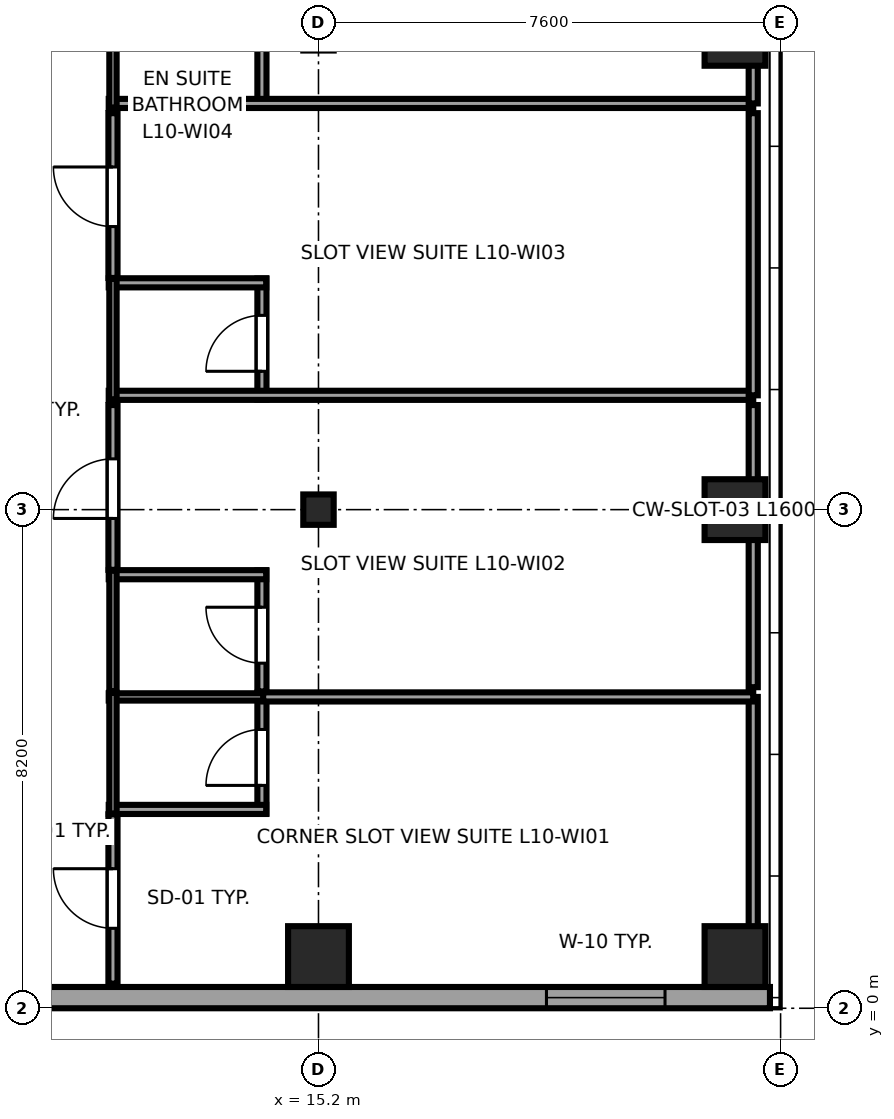
"""IFC4 building model, lengths in metres.
Left out: names, types, materials, properties, quantities, classifications, styles, units other than length and angle.
Written with IfcOpenShell. Run it as: python <this file> out.ifc"""

import sys

from ifc_helpers import new_model, si_unit, direction, frame, frame_2d, origin, origin_2d, place, context, subcontext, project, spatial, rectangle, i_section, extrude, source, transform, mapped, element, fill, save


model = new_model("IFC4")
c1 = context("Model", 3, precision=1e-05, world=origin(), true_north=direction((0.0, 1.0)))
c2 = subcontext(c1, "Body", "Model", "MODEL_VIEW")
j1 = project(units=[si_unit("LENGTHUNIT", "METRE"), si_unit("PLANEANGLEUNIT", "RADIAN")], contexts=[c1])
p1 = place(None, origin())
s1 = spatial("IfcSite", under=j1, at=p1, CompositionType="ELEMENT")
p2 = place(p1, origin())
s2 = spatial("IfcBuilding", under=s1, at=p2, CompositionType="ELEMENT")
p3 = place(p2, frame((0.0, 0.0, 46.2)))
s3 = spatial("IfcBuildingStorey", under=s2, at=p3, CompositionType="ELEMENT", Elevation=46.2)
m1 = source(origin(), c2, "Body", "SweptSolid", [
    extrude(rectangle(XDim=1.0, YDim=1.0, at=origin_2d()), origin(), (0.0, 0.0, 1.0), 3.55),
])
p4 = place(p3, frame((15.2, 0.85, 0.0), z_axis=(0.0, 0.0, 1.0), x_axis=(1.0, 0.0, 0.0)))
e1 = element("IfcColumn", 1, at=p4, inside=s3, PredefinedType="COLUMN", context=c2, shape_type="MappedRepresentation", body=[
    mapped(m1, transform((0.0, 0.0, 0.0), x_axis=(1.0, 0.0, 0.0), y_axis=(0.0, 1.0, 0.0), z_axis=(0.0, 0.0, 1.0), scale=1.0)),
])
m2 = source(origin(), c2, "Body", "SweptSolid", [
    extrude(i_section(OverallWidth=0.5, OverallDepth=0.5, WebThickness=0.028, FlangeThickness=0.045, at=origin_2d()), origin(), (0.0, 0.0, 1.0), 3.55),
])
p5 = place(p3, frame((15.2, 8.2, 0.0), z_axis=(0.0, 0.0, 1.0), x_axis=(1.0, 0.0, 0.0)))
e2 = element("IfcColumn", 2, at=p5, inside=s3, PredefinedType="COLUMN", context=c2, shape_type="MappedRepresentation", body=[
    mapped(m2, transform((0.0, 0.0, 0.0), x_axis=(1.0, 0.0, 0.0), y_axis=(0.0, 1.0, 0.0), z_axis=(0.0, 0.0, 1.0), scale=1.0)),
])
for number, where, z_axis, x_axis in (
    (3, (22.05, 0.85, 0.0), (0.0, 0.0, 1.0), (1.0, 0.0, 0.0)),
    (4, (22.05, 8.2, 0.0), (0.0, 0.0, 1.0), (1.0, 0.0, 0.0)),
    (5, (22.05, 16.0, 0.0), (0.0, 0.0, 1.0), (1.0, 0.0, 0.0)),
):
    element("IfcColumn", number, at=place(p3, frame(where, z_axis=z_axis, x_axis=x_axis)), inside=s3, PredefinedType="COLUMN", context=c2, shape_type="MappedRepresentation", body=[
        mapped(m1, transform((0.0, 0.0, 0.0), x_axis=(1.0, 0.0, 0.0), y_axis=(0.0, 1.0, 0.0), z_axis=(0.0, 0.0, 1.0), scale=1.0)),
    ])
p6 = place(p3, frame((4.617, 0.175, 0.0), z_axis=(0.0, 0.0, 1.0), x_axis=(1.0, 0.0, 0.0)))
e6 = element("IfcWall", 6, at=p6, inside=s3, PredefinedType="SOLIDWALL", context=c2, shape_type="SweptSolid", body=[
    extrude(rectangle(XDim=18.008, YDim=0.35, at=frame_2d((9.004, 0.0))), origin(), (0.0, 0.0, 1.0), 3.37),
])
p7 = place(p6, frame((14.332, 0.0, 0.68)))
e7 = element("IfcOpeningElement", 7, at=p7, cuts=e6, PredefinedType="OPENING", context=c2, shape_type="SweptSolid", body=[
    extrude(rectangle(XDim=1.95, YDim=1.82, at=frame_2d((0.975, 0.91))), frame((0.0, 0.185, 0.0), z_axis=(0.0, -1.0, 0.0), x_axis=(1.0, 0.0, 0.0)), (0.0, 0.0, 1.0), 0.37),
])
p8 = place(p3, frame((14.27, 3.2, 0.0), z_axis=(0.0, 0.0, 1.0), x_axis=(0.0, 1.0, 0.0)))
e8 = element("IfcWall", 8, at=p8, inside=s3, PredefinedType="PARTITIONING", context=c2, shape_type="SweptSolid", body=[
    extrude(rectangle(XDim=1.99, YDim=0.15, at=frame_2d((0.995, 0.0))), origin(), (0.0, 0.0, 1.0), 3.37),
])
p9 = place(p8, frame((0.465, 0.0, 0.0)))
e9 = element("IfcOpeningElement", 9, at=p9, cuts=e8, PredefinedType="OPENING", context=c2, shape_type="SweptSolid", body=[
    extrude(rectangle(XDim=0.92, YDim=2.01, at=frame_2d((0.46, 1.005))), frame((0.0, 0.085, 0.0), z_axis=(0.0, -1.0, 0.0), x_axis=(1.0, 0.0, 0.0)), (0.0, 0.0, 1.0), 0.17),
])
p10 = place(p3, frame((11.75, 3.27, 0.0), z_axis=(0.0, 0.0, 1.0), x_axis=(1.0, 0.0, 0.0)))
e10 = element("IfcWall", 10, at=p10, inside=s3, PredefinedType="PARTITIONING", context=c2, shape_type="SweptSolid", body=[
    extrude(rectangle(XDim=2.59, YDim=0.15, at=frame_2d((1.295, 0.0))), origin(), (0.0, 0.0, 1.0), 3.37),
])
p11 = place(p3, frame((11.75, 5.12, 0.0), z_axis=(0.0, 0.0, 1.0), x_axis=(1.0, 0.0, 0.0)))
e11 = element("IfcWall", 11, at=p11, inside=s3, PredefinedType="PLUMBINGWALL", context=c2, shape_type="SweptSolid", body=[
    extrude(rectangle(XDim=2.59, YDim=0.12, at=frame_2d((1.295, 0.0))), origin(), (0.0, 0.0, 1.0), 3.37),
])
p12 = place(p3, frame((11.82, 3.2, 0.0), z_axis=(0.0, 0.0, 1.0), x_axis=(0.0, 1.0, 0.0)))
e12 = element("IfcWall", 12, at=p12, inside=s3, PredefinedType="PLUMBINGWALL", context=c2, shape_type="SweptSolid", body=[
    extrude(rectangle(XDim=1.99, YDim=0.12, at=frame_2d((0.995, 0.0))), origin(), (0.0, 0.0, 1.0), 3.37),
])
p13 = place(p3, frame((14.27, 5.21, 0.0), z_axis=(0.0, 0.0, 1.0), x_axis=(0.0, 1.0, 0.0)))
e13 = element("IfcWall", 13, at=p13, inside=s3, PredefinedType="PARTITIONING", context=c2, shape_type="SweptSolid", body=[
    extrude(rectangle(XDim=1.99, YDim=0.15, at=frame_2d((0.995, 0.0))), origin(), (0.0, 0.0, 1.0), 3.37),
])
p14 = place(p13, frame((0.465, 0.0, 0.0)))
e14 = element("IfcOpeningElement", 14, at=p14, cuts=e13, PredefinedType="OPENING", context=c2, shape_type="SweptSolid", body=[
    extrude(rectangle(XDim=0.92, YDim=2.01, at=frame_2d((0.46, 1.005))), frame((0.0, 0.085, 0.0), z_axis=(0.0, -1.0, 0.0), x_axis=(1.0, 0.0, 0.0)), (0.0, 0.0, 1.0), 0.17),
])
p15 = place(p3, frame((11.75, 7.13, 0.0), z_axis=(0.0, 0.0, 1.0), x_axis=(1.0, 0.0, 0.0)))
e15 = element("IfcWall", 15, at=p15, inside=s3, PredefinedType="PARTITIONING", context=c2, shape_type="SweptSolid", body=[
    extrude(rectangle(XDim=2.59, YDim=0.15, at=frame_2d((1.295, 0.0))), origin(), (0.0, 0.0, 1.0), 3.37),
])
p16 = place(p3, frame((11.82, 5.21, 0.0), z_axis=(0.0, 0.0, 1.0), x_axis=(0.0, 1.0, 0.0)))
e16 = element("IfcWall", 16, at=p16, inside=s3, PredefinedType="PLUMBINGWALL", context=c2, shape_type="SweptSolid", body=[
    extrude(rectangle(XDim=1.99, YDim=0.12, at=frame_2d((0.995, 0.0))), origin(), (0.0, 0.0, 1.0), 3.37),
])
p17 = place(p3, frame((14.27, 10.01, 0.0), z_axis=(0.0, 0.0, 1.0), x_axis=(0.0, 1.0, 0.0)))
e17 = element("IfcWall", 17, at=p17, inside=s3, PredefinedType="PARTITIONING", context=c2, shape_type="SweptSolid", body=[
    extrude(rectangle(XDim=1.99, YDim=0.15, at=frame_2d((0.995, 0.0))), origin(), (0.0, 0.0, 1.0), 3.37),
])
p18 = place(p17, frame((0.465, 0.0, 0.0)))
e18 = element("IfcOpeningElement", 18, at=p18, cuts=e17, PredefinedType="OPENING", context=c2, shape_type="SweptSolid", body=[
    extrude(rectangle(XDim=0.92, YDim=2.01, at=frame_2d((0.46, 1.005))), frame((0.0, 0.085, 0.0), z_axis=(0.0, -1.0, 0.0), x_axis=(1.0, 0.0, 0.0)), (0.0, 0.0, 1.0), 0.17),
])
p19 = place(p3, frame((11.75, 10.08, 0.0), z_axis=(0.0, 0.0, 1.0), x_axis=(1.0, 0.0, 0.0)))
e19 = element("IfcWall", 19, at=p19, inside=s3, PredefinedType="PARTITIONING", context=c2, shape_type="SweptSolid", body=[
    extrude(rectangle(XDim=10.6, YDim=0.15, at=frame_2d((5.3, 0.0))), origin(), (0.0, 0.0, 1.0), 3.37),
])
p20 = place(p3, frame((11.75, 11.93, 0.0), z_axis=(0.0, 0.0, 1.0), x_axis=(1.0, 0.0, 0.0)))
e20 = element("IfcWall", 20, at=p20, inside=s3, PredefinedType="PARTITIONING", context=c2, shape_type="SweptSolid", body=[
    extrude(rectangle(XDim=2.59, YDim=0.15, at=frame_2d((1.295, 0.0))), origin(), (0.0, 0.0, 1.0), 3.37),
])
p21 = place(p3, frame((11.82, 10.01, 0.0), z_axis=(0.0, 0.0, 1.0), x_axis=(0.0, 1.0, 0.0)))
e21 = element("IfcWall", 21, at=p21, inside=s3, PredefinedType="PLUMBINGWALL", context=c2, shape_type="SweptSolid", body=[
    extrude(rectangle(XDim=1.99, YDim=0.12, at=frame_2d((0.995, 0.0))), origin(), (0.0, 0.0, 1.0), 3.37),
])
p22 = place(p3, frame((14.27, 14.81, 0.0), z_axis=(0.0, 0.0, 1.0), x_axis=(0.0, 1.0, 0.0)))
e22 = element("IfcWall", 22, at=p22, inside=s3, PredefinedType="PARTITIONING", context=c2, shape_type="SweptSolid", body=[
    extrude(rectangle(XDim=1.99, YDim=0.15, at=frame_2d((0.995, 0.0))), origin(), (0.0, 0.0, 1.0), 3.37),
])
p23 = place(p3, frame((11.75, 14.88, 0.0), z_axis=(0.0, 0.0, 1.0), x_axis=(1.0, 0.0, 0.0)))
e23 = element("IfcWall", 23, at=p23, inside=s3, PredefinedType="PARTITIONING", context=c2, shape_type="SweptSolid", body=[
    extrude(rectangle(XDim=10.6, YDim=0.15, at=frame_2d((5.3, 0.0))), origin(), (0.0, 0.0, 1.0), 3.37),
])
p24 = place(p3, frame((11.82, 14.81, 0.0), z_axis=(0.0, 0.0, 1.0), x_axis=(0.0, 1.0, 0.0)))
e24 = element("IfcWall", 24, at=p24, inside=s3, PredefinedType="PLUMBINGWALL", context=c2, shape_type="SweptSolid", body=[
    extrude(rectangle(XDim=1.99, YDim=0.12, at=frame_2d((0.995, 0.0))), origin(), (0.0, 0.0, 1.0), 3.37),
])
p25 = place(p3, frame((11.82, 0.405, 0.0), z_axis=(0.0, 0.0, 1.0), x_axis=(0.0, 1.0, 0.0)))
e25 = element("IfcWall", 25, at=p25, inside=s3, PredefinedType="PARTITIONING", context=c2, shape_type="SweptSolid", body=[
    extrude(rectangle(XDim=2.785, YDim=0.15, at=frame_2d((1.393, 0.0))), origin(), (0.0, 0.0, 1.0), 3.37),
])
p26 = place(p25, frame((0.91, 0.0, 0.0)))
e26 = element("IfcOpeningElement", 26, at=p26, cuts=e25, PredefinedType="OPENING", context=c2, shape_type="SweptSolid", body=[
    extrude(rectangle(XDim=0.98, YDim=2.12, at=frame_2d((0.49, 1.06))), frame((0.0, 0.085, 0.0), z_axis=(0.0, -1.0, 0.0), x_axis=(1.0, 0.0, 0.0)), (0.0, 0.0, 1.0), 0.17),
])
p27 = place(p3, frame((22.35, 0.405, 0.0), z_axis=(0.0, 0.0, 1.0), x_axis=(0.0, 1.0, 0.0)))
e27 = element("IfcWall", 27, at=p27, inside=s3, PredefinedType="PARTITIONING", context=c2, shape_type="SweptSolid", body=[
    extrude(rectangle(XDim=4.715, YDim=0.15, at=frame_2d((2.357, 0.0))), origin(), (0.0, 0.0, 1.0), 3.37),
])
p28 = place(p3, frame((14.29, 5.12, 0.0), z_axis=(0.0, 0.0, 1.0), x_axis=(1.0, 0.0, 0.0)))
e28 = element("IfcWall", 28, at=p28, inside=s3, PredefinedType="PARTITIONING", context=c2, shape_type="SweptSolid", body=[
    extrude(rectangle(XDim=8.06, YDim=0.15, at=frame_2d((4.03, 0.0))), origin(), (0.0, 0.0, 1.0), 3.37),
])
p29 = place(p3, frame((11.82, 7.21, 0.0), z_axis=(0.0, 0.0, 1.0), x_axis=(0.0, 1.0, 0.0)))
e29 = element("IfcWall", 29, at=p29, inside=s3, PredefinedType="PARTITIONING", context=c2, shape_type="SweptSolid", body=[
    extrude(rectangle(XDim=2.71, YDim=0.15, at=frame_2d((1.355, 0.0))), origin(), (0.0, 0.0, 1.0), 3.37),
])
p30 = place(p29, frame((0.845, 0.0, 0.0)))
e30 = element("IfcOpeningElement", 30, at=p30, cuts=e29, PredefinedType="OPENING", context=c2, shape_type="SweptSolid", body=[
    extrude(rectangle(XDim=0.98, YDim=2.12, at=frame_2d((0.49, 1.06))), frame((0.0, 0.085, 0.0), z_axis=(0.0, -1.0, 0.0), x_axis=(1.0, 0.0, 0.0)), (0.0, 0.0, 1.0), 0.17),
])
p31 = place(p3, frame((22.35, 5.28, 0.0), z_axis=(0.0, 0.0, 1.0), x_axis=(0.0, 1.0, 0.0)))
e31 = element("IfcWall", 31, at=p31, inside=s3, PredefinedType="PARTITIONING", context=c2, shape_type="SweptSolid", body=[
    extrude(rectangle(XDim=4.64, YDim=0.15, at=frame_2d((2.32, 0.0))), origin(), (0.0, 0.0, 1.0), 3.37),
])
p32 = place(p3, frame((11.82, 12.01, 0.0), z_axis=(0.0, 0.0, 1.0), x_axis=(0.0, 1.0, 0.0)))
e32 = element("IfcWall", 32, at=p32, inside=s3, PredefinedType="PARTITIONING", context=c2, shape_type="SweptSolid", body=[
    extrude(rectangle(XDim=2.71, YDim=0.15, at=frame_2d((1.355, 0.0))), origin(), (0.0, 0.0, 1.0), 3.37),
])
p33 = place(p32, frame((0.845, 0.0, 0.0)))
e33 = element("IfcOpeningElement", 33, at=p33, cuts=e32, PredefinedType="OPENING", context=c2, shape_type="SweptSolid", body=[
    extrude(rectangle(XDim=0.98, YDim=2.12, at=frame_2d((0.49, 1.06))), frame((0.0, 0.085, 0.0), z_axis=(0.0, -1.0, 0.0), x_axis=(1.0, 0.0, 0.0)), (0.0, 0.0, 1.0), 0.17),
])
p34 = place(p3, frame((22.35, 10.08, 0.0), z_axis=(0.0, 0.0, 1.0), x_axis=(0.0, 1.0, 0.0)))
e34 = element("IfcWall", 34, at=p34, inside=s3, PredefinedType="PARTITIONING", context=c2, shape_type="SweptSolid", body=[
    extrude(rectangle(XDim=4.64, YDim=0.15, at=frame_2d((2.32, 0.0))), origin(), (0.0, 0.0, 1.0), 3.37),
])
p35 = place(p3, frame((22.35, 14.88, 0.0), z_axis=(0.0, 0.0, 1.0), x_axis=(0.0, 1.0, 0.0)))
e35 = element("IfcWall", 35, at=p35, inside=s3, PredefinedType="PARTITIONING", context=c2, shape_type="SweptSolid", body=[
    extrude(rectangle(XDim=4.54, YDim=0.15, at=frame_2d((2.27, 0.0))), origin(), (0.0, 0.0, 1.0), 3.37),
])
m3 = source(origin(), c2, "Body", "SweptSolid", [
    extrude(rectangle(XDim=1.95, YDim=1.82, at=frame_2d((0.975, 0.91))), frame((0.0, 0.09, 0.0), z_axis=(0.0, -1.0, 0.0), x_axis=(1.0, 0.0, 0.0)), (0.0, 0.0, 1.0), 0.06),
])
p36 = place(p7, origin())
e36 = element("IfcWindow", 36, at=p36, inside=s3, PartitioningType="DOUBLE_PANEL_VERTICAL", PredefinedType="WINDOW", context=c2, shape_type="MappedRepresentation", body=[
    mapped(m3, transform((0.0, 0.0, 0.0), x_axis=(1.0, 0.0, 0.0), y_axis=(0.0, 1.0, 0.0), z_axis=(0.0, 0.0, 1.0), scale=1.0)),
])
fill(e7, e36)
m4 = source(origin(), c2, "Body", "SweptSolid", [
    extrude(rectangle(XDim=0.92, YDim=2.01, at=frame_2d((0.46, 1.005))), frame((0.0, 0.025, 0.0), z_axis=(0.0, -1.0, 0.0), x_axis=(1.0, 0.0, 0.0)), (0.0, 0.0, 1.0), 0.05),
])
p37 = place(p9, origin())
e37 = element("IfcDoor", 37, at=p37, inside=s3, OperationType="SINGLE_SWING_LEFT", PredefinedType="DOOR", context=c2, shape_type="MappedRepresentation", body=[
    mapped(m4, transform((0.0, 0.0, 0.0), x_axis=(1.0, 0.0, 0.0), y_axis=(0.0, 1.0, 0.0), z_axis=(0.0, 0.0, 1.0), scale=1.0)),
])
fill(e9, e37)
p38 = place(p14, origin())
e38 = element("IfcDoor", 38, at=p38, inside=s3, OperationType="SINGLE_SWING_RIGHT", PredefinedType="DOOR", context=c2, shape_type="MappedRepresentation", body=[
    mapped(m4, transform((0.0, 0.0, 0.0), x_axis=(1.0, 0.0, 0.0), y_axis=(0.0, 1.0, 0.0), z_axis=(0.0, 0.0, 1.0), scale=1.0)),
])
fill(e14, e38)
p39 = place(p18, origin())
e39 = element("IfcDoor", 39, at=p39, inside=s3, OperationType="SINGLE_SWING_LEFT", PredefinedType="DOOR", context=c2, shape_type="MappedRepresentation", body=[
    mapped(m4, transform((0.0, 0.0, 0.0), x_axis=(1.0, 0.0, 0.0), y_axis=(0.0, 1.0, 0.0), z_axis=(0.0, 0.0, 1.0), scale=1.0)),
])
fill(e18, e39)
m5 = source(origin(), c2, "Body", "SweptSolid", [
    extrude(rectangle(XDim=0.98, YDim=2.12, at=frame_2d((0.49, 1.06))), frame((0.0, 0.025, 0.0), z_axis=(0.0, -1.0, 0.0), x_axis=(1.0, 0.0, 0.0)), (0.0, 0.0, 1.0), 0.05),
])
p40 = place(p26, origin())
e40 = element("IfcDoor", 40, at=p40, inside=s3, OperationType="SINGLE_SWING_RIGHT", PredefinedType="DOOR", context=c2, shape_type="MappedRepresentation", body=[
    mapped(m5, transform((0.0, 0.0, 0.0), x_axis=(1.0, 0.0, 0.0), y_axis=(0.0, 1.0, 0.0), z_axis=(0.0, 0.0, 1.0), scale=1.0)),
])
fill(e26, e40)
p41 = place(p30, origin())
e41 = element("IfcDoor", 41, at=p41, inside=s3, OperationType="SINGLE_SWING_LEFT", PredefinedType="DOOR", context=c2, shape_type="MappedRepresentation", body=[
    mapped(m5, transform((0.0, 0.0, 0.0), x_axis=(1.0, 0.0, 0.0), y_axis=(0.0, 1.0, 0.0), z_axis=(0.0, 0.0, 1.0), scale=1.0)),
])
fill(e30, e41)
p42 = place(p33, origin())
e42 = element("IfcDoor", 42, at=p42, inside=s3, OperationType="SINGLE_SWING_RIGHT", PredefinedType="DOOR", context=c2, shape_type="MappedRepresentation", body=[
    mapped(m5, transform((0.0, 0.0, 0.0), x_axis=(1.0, 0.0, 0.0), y_axis=(0.0, 1.0, 0.0), z_axis=(0.0, 0.0, 1.0), scale=1.0)),
])
fill(e33, e42)
save(model, sys.argv[1])
